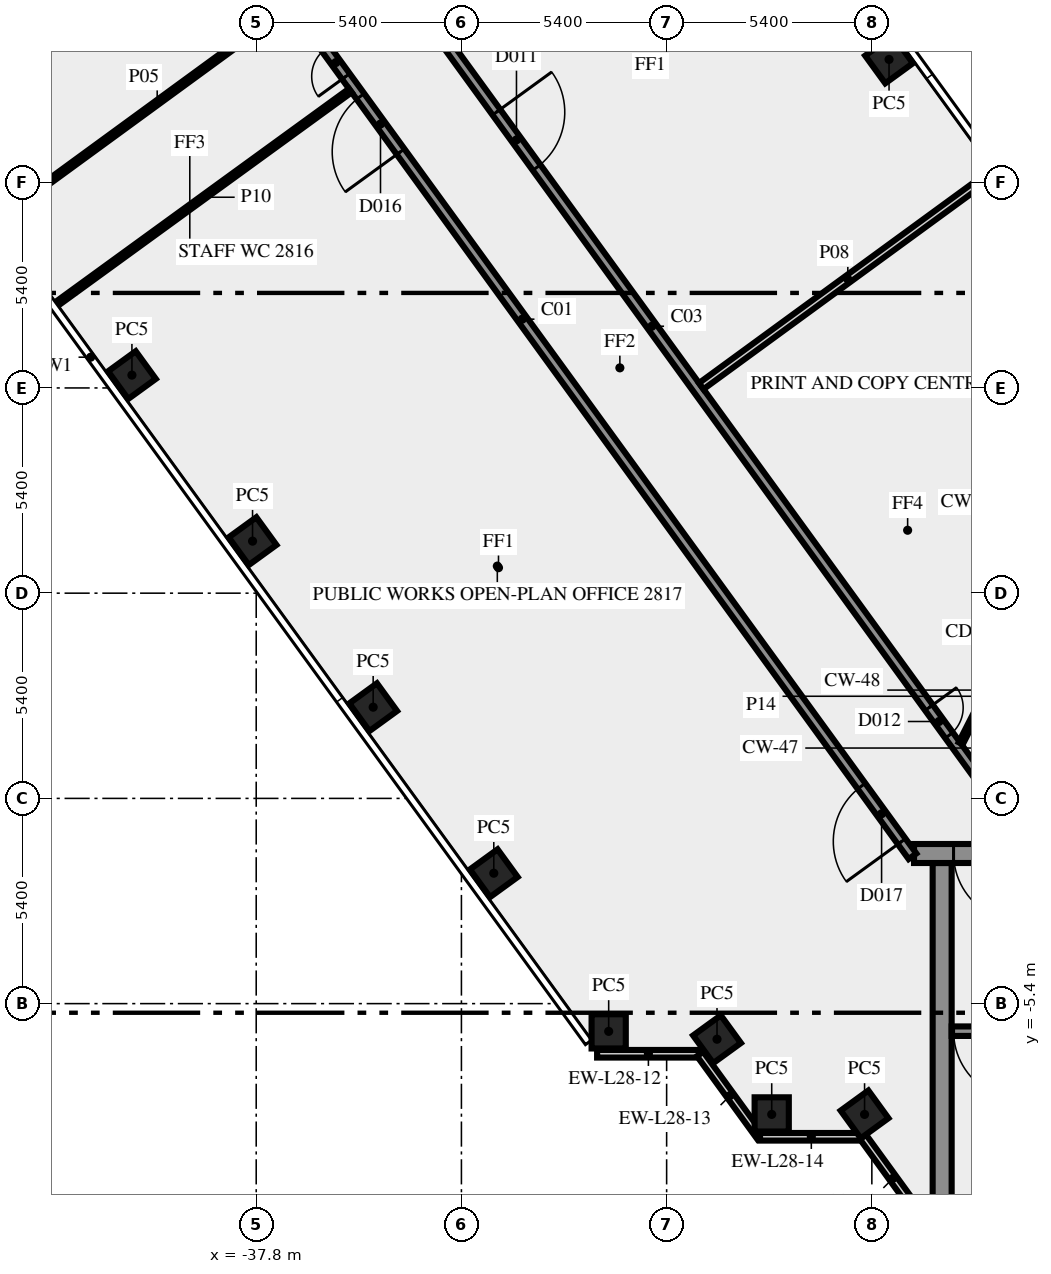
"""IFC4 building model, lengths in metres.
Left out: names, types, materials, properties, quantities, classifications, styles, units other than length and angle.
Written with IfcOpenShell. Run it as: python <this file> out.ifc"""

import sys

from ifc_helpers import new_model, si_unit, direction, frame, frame_2d, origin, origin_2d, place, context, subcontext, project, spatial, rectangle, extrude, element, fill, save


model = new_model("IFC4")
c1 = context("Model", 3, precision=1e-05, world=origin(), true_north=direction((0.0, 1.0)))
c2 = subcontext(c1, "Body", "Model", "MODEL_VIEW")
j1 = project(units=[si_unit("LENGTHUNIT", "METRE"), si_unit("PLANEANGLEUNIT", "RADIAN")], contexts=[c1])
p1 = place(None, origin())
s1 = spatial("IfcSite", under=j1, at=p1, CompositionType="ELEMENT")
p2 = place(p1, origin())
s2 = spatial("IfcBuilding", under=s1, at=p2, CompositionType="ELEMENT")
p3 = place(p2, frame((0.0, 0.0, 121.0)))
s3 = spatial("IfcBuildingStorey", under=s2, at=p3, CompositionType="ELEMENT", Elevation=121.0)
for number, where, z_axis, x_axis in (
    (1, (-21.147, 19.444, 0.0), (0.0, 0.0, 1.0), (-0.588, 0.809, 0.0)),
    (2, (-41.07, 11.137, 0.0), (0.0, 0.0, 1.0), (0.588, -0.809, 0.0)),
    (3, (-37.896, 6.769, 0.0), (0.0, 0.0, 1.0), (0.588, -0.809, 0.0)),
    (4, (-34.722, 2.4, 0.0), (0.0, 0.0, 1.0), (0.588, -0.809, 0.0)),
    (5, (-31.548, -1.969, 0.0), (0.0, 0.0, 1.0), (0.588, -0.809, 0.0)),
    (6, (-28.525, -6.13, 0.0), (0.0, 0.0, 1.0), (1.0, 0.0, 0.0)),
    (7, (-25.674, -6.337, 0.0), (0.0, 0.0, 1.0), (0.588, -0.809, 0.0)),
    (8, (-24.235, -8.315, 0.0), (0.0, 0.0, 1.0), (1.0, 0.0, 0.0)),
    (9, (-21.792, -8.315, 0.0), (0.0, 0.0, 1.0), (0.588, -0.809, 0.0)),
):
    element("IfcColumn", number, at=place(p3, frame(where, z_axis=z_axis, x_axis=x_axis)), inside=s3, PredefinedType="COLUMN", context=c2, shape_type="SweptSolid", body=[
        extrude(rectangle(XDim=0.9, YDim=0.9, at=origin_2d()), origin(), (0.0, 0.0, 1.0), 3.65),
    ])
p4 = place(p3, frame((-28.83, -6.719, 0.0), z_axis=(0.0, 0.0, 1.0), x_axis=(1.0, 0.0, 0.0)))
e10 = element("IfcWall", 10, at=p4, inside=s3, PredefinedType="SOLIDWALL", context=c2, shape_type="SweptSolid", body=[
    extrude(rectangle(XDim=2.7, YDim=0.2, at=frame_2d((1.35, 0.0))), origin(), (0.0, 0.0, 1.0), 3.65),
])
p5 = place(p3, frame((-26.12, -6.724, 0.0), z_axis=(0.0, 0.0, 1.0), x_axis=(0.587720002413, -0.809064397168, 0.0)))
e11 = element("IfcWall", 11, at=p5, inside=s3, PredefinedType="SOLIDWALL", context=c2, shape_type="SweptSolid", body=[
    extrude(rectangle(XDim=2.7, YDim=0.2, at=frame_2d((1.35, 0.0))), origin(), (0.0, 0.0, 1.0), 3.65),
])
p6 = place(p3, frame((-24.543, -8.904, 0.0), z_axis=(0.0, 0.0, 1.0), x_axis=(1.0, 0.0, 0.0)))
e12 = element("IfcWall", 12, at=p6, inside=s3, PredefinedType="SOLIDWALL", context=c2, shape_type="SweptSolid", body=[
    extrude(rectangle(XDim=2.7, YDim=0.2, at=frame_2d((1.35, 0.0))), origin(), (0.0, 0.0, 1.0), 3.65),
])
p7 = place(p3, frame((-21.833, -8.909, 0.0), z_axis=(0.0, 0.0, 1.0), x_axis=(0.587766567315, -0.809030569476, 0.0)))
e13 = element("IfcWall", 13, at=p7, inside=s3, PredefinedType="SOLIDWALL", context=c2, shape_type="SweptSolid", body=[
    extrude(rectangle(XDim=2.688, YDim=0.2, at=frame_2d((1.344, 0.0))), origin(), (0.0, 0.0, 1.0), 3.65),
])
p8 = place(p3, frame((-19.75, -10.5, 0.0), z_axis=(0.0, 0.0, 1.0), x_axis=(0.0, 1.0, 0.0)))
e14 = element("IfcWall", 14, at=p8, inside=s3, PredefinedType="SHEAR", context=c2, shape_type="SweptSolid", body=[
    extrude(rectangle(XDim=8.8, YDim=0.5, at=frame_2d((4.4, 0.0))), origin(), (0.0, 0.0, 1.0), 3.65),
])
p9 = place(p3, frame((-11.45, -6.125, 0.0), z_axis=(0.0, 0.0, 1.0), x_axis=(-1.0, 0.0, 0.0)))
e15 = element("IfcWall", 15, at=p9, inside=s3, PredefinedType="SHEAR", context=c2, shape_type="SweptSolid", body=[
    extrude(rectangle(XDim=8.05, YDim=0.25, at=frame_2d((4.025, 0.0))), origin(), (0.0, 0.0, 1.0), 3.65),
])
p10 = place(p9, frame((6.2, 0.0, 0.0)))
e16 = element("IfcOpeningElement", 16, at=p10, cuts=e15, PredefinedType="OPENING", context=c2, shape_type="SweptSolid", body=[
    extrude(rectangle(XDim=1.8, YDim=2.1, at=frame_2d((0.9, 1.05))), frame((0.0, 0.135, 0.0), z_axis=(0.0, -1.0, 0.0), x_axis=(1.0, 0.0, 0.0)), (0.0, 0.0, 1.0), 0.27),
])
p11 = place(p3, frame((20.49, -1.45, 0.0), z_axis=(0.0, 0.0, 1.0), x_axis=(-1.0, 0.0, 0.0)))
e17 = element("IfcWall", 17, at=p11, inside=s3, PredefinedType="SHEAR", context=c2, shape_type="SweptSolid", body=[
    extrude(rectangle(XDim=40.98, YDim=0.5, at=frame_2d((20.49, 0.0))), origin(), (0.0, 0.0, 1.0), 3.65),
])
p12 = place(p11, frame((38.14, 0.0, 0.0)))
e18 = element("IfcOpeningElement", 18, at=p12, cuts=e17, PredefinedType="OPENING", context=c2, shape_type="SweptSolid", body=[
    extrude(rectangle(XDim=1.8, YDim=2.1, at=frame_2d((0.9, 1.05))), frame((0.0, 0.26, 0.0), z_axis=(0.0, -1.0, 0.0), x_axis=(1.0, 0.0, 0.0)), (0.0, 0.0, 1.0), 0.52),
])
p13 = place(p11, frame((35.89, 0.0, 0.0)))
e19 = element("IfcOpeningElement", 19, at=p13, cuts=e17, PredefinedType="OPENING", context=c2, shape_type="SweptSolid", body=[
    extrude(rectangle(XDim=0.9, YDim=2.1, at=frame_2d((0.45, 1.05))), frame((0.0, 0.26, 0.0), z_axis=(0.0, -1.0, 0.0), x_axis=(1.0, 0.0, 0.0)), (0.0, 0.0, 1.0), 0.52),
])
p14 = place(p11, frame((32.94, 0.0, 0.0)))
e20 = element("IfcOpeningElement", 20, at=p14, cuts=e17, PredefinedType="OPENING", context=c2, shape_type="SweptSolid", body=[
    extrude(rectangle(XDim=0.9, YDim=2.1, at=frame_2d((0.45, 1.05))), frame((0.0, 0.26, 0.0), z_axis=(0.0, -1.0, 0.0), x_axis=(1.0, 0.0, 0.0)), (0.0, 0.0, 1.0), 0.52),
])
p15 = place(p11, frame((19.59, 0.0, 0.0)))
e21 = element("IfcOpeningElement", 21, at=p15, cuts=e17, PredefinedType="OPENING", context=c2, shape_type="SweptSolid", body=[
    extrude(rectangle(XDim=2.0, YDim=2.1, at=frame_2d((1.0, 1.05))), frame((0.0, 0.26, 0.0), z_axis=(0.0, -1.0, 0.0), x_axis=(1.0, 0.0, 0.0)), (0.0, 0.0, 1.0), 0.52),
])
p16 = place(p11, frame((7.14, 0.0, 0.0)))
e22 = element("IfcOpeningElement", 22, at=p16, cuts=e17, PredefinedType="OPENING", context=c2, shape_type="SweptSolid", body=[
    extrude(rectangle(XDim=0.9, YDim=2.1, at=frame_2d((0.45, 1.05))), frame((0.0, 0.26, 0.0), z_axis=(0.0, -1.0, 0.0), x_axis=(1.0, 0.0, 0.0)), (0.0, 0.0, 1.0), 0.52),
])
p17 = place(p11, frame((5.028, 0.0, 0.0)))
e23 = element("IfcOpeningElement", 23, at=p17, cuts=e17, PredefinedType="OPENING", context=c2, shape_type="SweptSolid", body=[
    extrude(rectangle(XDim=0.8, YDim=2.1, at=frame_2d((0.4, 1.05))), frame((0.0, 0.26, 0.0), z_axis=(0.0, -1.0, 0.0), x_axis=(1.0, 0.0, 0.0)), (0.0, 0.0, 1.0), 0.52),
])
p18 = place(p11, frame((3.452, 0.0, 0.0)))
e24 = element("IfcOpeningElement", 24, at=p18, cuts=e17, PredefinedType="OPENING", context=c2, shape_type="SweptSolid", body=[
    extrude(rectangle(XDim=0.8, YDim=2.1, at=frame_2d((0.4, 1.05))), frame((0.0, 0.26, 0.0), z_axis=(0.0, -1.0, 0.0), x_axis=(1.0, 0.0, 0.0)), (0.0, 0.0, 1.0), 0.52),
])
p19 = place(p11, frame((1.04, 0.0, 0.0)))
e25 = element("IfcOpeningElement", 25, at=p19, cuts=e17, PredefinedType="OPENING", context=c2, shape_type="SweptSolid", body=[
    extrude(rectangle(XDim=1.8, YDim=2.1, at=frame_2d((0.9, 1.05))), frame((0.0, 0.26, 0.0), z_axis=(0.0, -1.0, 0.0), x_axis=(1.0, 0.0, 0.0)), (0.0, 0.0, 1.0), 0.52),
])
p20 = place(p3, frame((-20.531, -1.523, 0.0), z_axis=(0.0, 0.0, 1.0), x_axis=(-0.587784522481, 0.809017524614, 0.0)))
e26 = element("IfcWall", 26, at=p20, inside=s3, PredefinedType="SOLIDWALL", context=c2, shape_type="SweptSolid", body=[
    extrude(rectangle(XDim=49.912, YDim=0.25, at=frame_2d((24.956, 0.0))), origin(), (0.0, 0.0, 1.0), 3.65),
])
p21 = place(p20, frame((34.816, 0.0, 0.0)))
e27 = element("IfcOpeningElement", 27, at=p21, cuts=e26, PredefinedType="OPENING", context=c2, shape_type="SweptSolid", body=[
    extrude(rectangle(XDim=0.9, YDim=2.1, at=frame_2d((0.45, 1.05))), frame((0.0, 0.135, 0.0), z_axis=(0.0, -1.0, 0.0), x_axis=(1.0, 0.0, 0.0)), (0.0, 0.0, 1.0), 0.27),
])
p22 = place(p20, frame((33.215, 0.0, 0.0)))
e28 = element("IfcOpeningElement", 28, at=p22, cuts=e26, PredefinedType="OPENING", context=c2, shape_type="SweptSolid", body=[
    extrude(rectangle(XDim=0.9, YDim=2.1, at=frame_2d((0.45, 1.05))), frame((0.0, 0.135, 0.0), z_axis=(0.0, -1.0, 0.0), x_axis=(1.0, 0.0, 0.0)), (0.0, 0.0, 1.0), 0.27),
])
p23 = place(p20, frame((22.916, 0.0, 0.0)))
e29 = element("IfcOpeningElement", 29, at=p23, cuts=e26, PredefinedType="OPENING", context=c2, shape_type="SweptSolid", body=[
    extrude(rectangle(XDim=1.8, YDim=2.1, at=frame_2d((0.9, 1.05))), frame((0.0, 0.135, 0.0), z_axis=(0.0, -1.0, 0.0), x_axis=(1.0, 0.0, 0.0)), (0.0, 0.0, 1.0), 0.27),
])
p24 = place(p20, frame((0.483, 0.0, 0.0)))
e30 = element("IfcOpeningElement", 30, at=p24, cuts=e26, PredefinedType="OPENING", context=c2, shape_type="SweptSolid", body=[
    extrude(rectangle(XDim=1.8, YDim=2.1, at=frame_2d((0.9, 1.05))), frame((0.0, 0.135, 0.0), z_axis=(0.0, -1.0, 0.0), x_axis=(1.0, 0.0, 0.0)), (0.0, 0.0, 1.0), 0.27),
])
p25 = place(p20, frame((25.365, 0.0, 0.0)))
e31 = element("IfcOpeningElement", 31, at=p25, cuts=e26, PredefinedType="OPENING", context=c2, shape_type="SweptSolid", body=[
    extrude(rectangle(XDim=0.9, YDim=2.1, at=frame_2d((0.45, 1.05))), frame((0.0, 0.135, 0.0), z_axis=(0.0, -1.0, 0.0), x_axis=(1.0, 0.0, 0.0)), (0.0, 0.0, 1.0), 0.27),
])
p26 = place(p3, frame((-37.232, 25.972, 0.0), z_axis=(0.0, 0.0, 1.0), x_axis=(0.587786323093, -0.809016216391, 0.0)))
e32 = element("IfcWall", 32, at=p26, inside=s3, PredefinedType="SOLIDWALL", context=c2, shape_type="SweptSolid", body=[
    extrude(rectangle(XDim=33.493, YDim=0.25, at=frame_2d((16.747, 0.0))), origin(), (0.0, 0.0, 1.0), 3.65),
])
p27 = place(p26, frame((9.785, 0.0, 0.0)))
e33 = element("IfcOpeningElement", 33, at=p27, cuts=e32, PredefinedType="OPENING", context=c2, shape_type="SweptSolid", body=[
    extrude(rectangle(XDim=1.8, YDim=2.1, at=frame_2d((0.9, 1.05))), frame((0.0, 0.135, 0.0), z_axis=(0.0, -1.0, 0.0), x_axis=(1.0, 0.0, 0.0)), (0.0, 0.0, 1.0), 0.27),
])
p28 = place(p26, frame((29.152, 0.0, 0.0)))
e34 = element("IfcOpeningElement", 34, at=p28, cuts=e32, PredefinedType="OPENING", context=c2, shape_type="SweptSolid", body=[
    extrude(rectangle(XDim=0.9, YDim=2.1, at=frame_2d((0.45, 1.05))), frame((0.0, 0.135, 0.0), z_axis=(0.0, -1.0, 0.0), x_axis=(1.0, 0.0, 0.0)), (0.0, 0.0, 1.0), 0.27),
])
p29 = place(p26, frame((1.335, 0.0, 0.0)))
e35 = element("IfcOpeningElement", 35, at=p29, cuts=e32, PredefinedType="OPENING", context=c2, shape_type="SweptSolid", body=[
    extrude(rectangle(XDim=0.9, YDim=2.1, at=frame_2d((0.45, 1.05))), frame((0.0, 0.135, 0.0), z_axis=(0.0, -1.0, 0.0), x_axis=(1.0, 0.0, 0.0)), (0.0, 0.0, 1.0), 0.27),
])
p30 = place(p3, frame((-43.876, 15.773, 0.0), z_axis=(0.0, 0.0, 1.0), x_axis=(0.807597163234, 0.589734535139, 0.0)))
e36 = element("IfcWall", 36, at=p30, inside=s3, PredefinedType="PARTITIONING", context=c2, shape_type="SweptSolid", body=[
    extrude(rectangle(XDim=8.595, YDim=0.12, at=frame_2d((4.298, 0.0))), origin(), (0.0, 0.0, 1.0), 3.65),
])
p31 = place(p3, frame((-26.089, 10.848, 0.0), z_axis=(0.0, 0.0, 1.0), x_axis=(0.807661302092, 0.589646691759, 0.0)))
e37 = element("IfcWall", 37, at=p31, inside=s3, PredefinedType="SOLIDWALL", context=c2, shape_type="SweptSolid", body=[
    extrude(rectangle(XDim=9.55, YDim=0.2, at=frame_2d((4.775, 0.0))), origin(), (0.0, 0.0, 1.0), 2.75),
])
p32 = place(p3, frame((-35.324, 18.625, 0.0), z_axis=(0.0, 0.0, 1.0), x_axis=(-0.808998008689, -0.58781138296, 0.0)))
e38 = element("IfcWall", 38, at=p32, inside=s3, PredefinedType="PARTITIONING", context=c2, shape_type="SweptSolid", body=[
    extrude(rectangle(XDim=9.55, YDim=0.12, at=frame_2d((4.775, 0.0))), origin(), (0.0, 0.0, 1.0), 2.75),
])
p33 = place(p3, frame((-19.261, 1.45, 0.0), z_axis=(0.0, 0.0, 1.0), x_axis=(0.453950796792, 0.891026752736, 0.0)))
e39 = element("IfcWall", 39, at=p33, inside=s3, PredefinedType="PARTITIONING", context=c2, shape_type="SweptSolid", body=[
    extrude(rectangle(XDim=2.778, YDim=0.12, at=frame_2d((1.389, 0.0))), origin(), (0.0, 0.0, 1.0), 3.65),
])
p34 = place(p10, origin())
e40 = element("IfcDoor", 40, at=p34, inside=s3, OperationType="DOUBLE_DOOR_SINGLE_SWING", PredefinedType="DOOR", context=c2, shape_type="SweptSolid", body=[
    extrude(rectangle(XDim=1.8, YDim=2.1, at=frame_2d((0.9, 1.05))), frame((0.0, 0.025, 0.0), z_axis=(0.0, -1.0, 0.0), x_axis=(1.0, 0.0, 0.0)), (0.0, 0.0, 1.0), 0.05),
])
fill(e16, e40)
p35 = place(p12, origin())
e41 = element("IfcDoor", 41, at=p35, inside=s3, OperationType="DOUBLE_DOOR_SINGLE_SWING", PredefinedType="DOOR", context=c2, shape_type="SweptSolid", body=[
    extrude(rectangle(XDim=1.8, YDim=2.1, at=frame_2d((0.9, 1.05))), frame((0.0, 0.025, 0.0), z_axis=(0.0, -1.0, 0.0), x_axis=(1.0, 0.0, 0.0)), (0.0, 0.0, 1.0), 0.05),
])
fill(e18, e41)
p36 = place(p27, origin())
e42 = element("IfcDoor", 42, at=p36, inside=s3, OperationType="DOUBLE_DOOR_SINGLE_SWING", PredefinedType="DOOR", context=c2, shape_type="SweptSolid", body=[
    extrude(rectangle(XDim=1.8, YDim=2.1, at=frame_2d((0.9, 1.05))), frame((0.0, 0.025, 0.0), z_axis=(0.0, -1.0, 0.0), x_axis=(1.0, 0.0, 0.0)), (0.0, 0.0, 1.0), 0.05),
])
fill(e33, e42)
p37 = place(p23, origin())
e43 = element("IfcDoor", 43, at=p37, inside=s3, OperationType="DOUBLE_DOOR_SINGLE_SWING", PredefinedType="DOOR", context=c2, shape_type="SweptSolid", body=[
    extrude(rectangle(XDim=1.8, YDim=2.1, at=frame_2d((0.9, 1.05))), frame((0.0, 0.025, 0.0), z_axis=(0.0, -1.0, 0.0), x_axis=(1.0, 0.0, 0.0)), (0.0, 0.0, 1.0), 0.05),
])
fill(e29, e43)
p38 = place(p24, origin())
e44 = element("IfcDoor", 44, at=p38, inside=s3, OperationType="DOUBLE_DOOR_SINGLE_SWING", PredefinedType="DOOR", context=c2, shape_type="SweptSolid", body=[
    extrude(rectangle(XDim=1.8, YDim=2.1, at=frame_2d((0.9, 1.05))), frame((0.0, 0.025, 0.0), z_axis=(0.0, -1.0, 0.0), x_axis=(1.0, 0.0, 0.0)), (0.0, 0.0, 1.0), 0.05),
])
fill(e30, e44)
p39 = place(p28, origin())
e45 = element("IfcDoor", 45, at=p39, inside=s3, OperationType="SINGLE_SWING_RIGHT", PredefinedType="DOOR", context=c2, shape_type="SweptSolid", body=[
    extrude(rectangle(XDim=0.9, YDim=2.1, at=frame_2d((0.45, 1.05))), frame((0.0, 0.025, 0.0), z_axis=(0.0, -1.0, 0.0), x_axis=(1.0, 0.0, 0.0)), (0.0, 0.0, 1.0), 0.05),
])
fill(e34, e45)
p40 = place(p25, origin())
e46 = element("IfcDoor", 46, at=p40, inside=s3, OperationType="SINGLE_SWING_LEFT", PredefinedType="DOOR", context=c2, shape_type="SweptSolid", body=[
    extrude(rectangle(XDim=0.9, YDim=2.1, at=frame_2d((0.45, 1.05))), frame((0.0, 0.025, 0.0), z_axis=(0.0, -1.0, 0.0), x_axis=(1.0, 0.0, 0.0)), (0.0, 0.0, 1.0), 0.05),
])
fill(e31, e46)
save(model, sys.argv[1])
